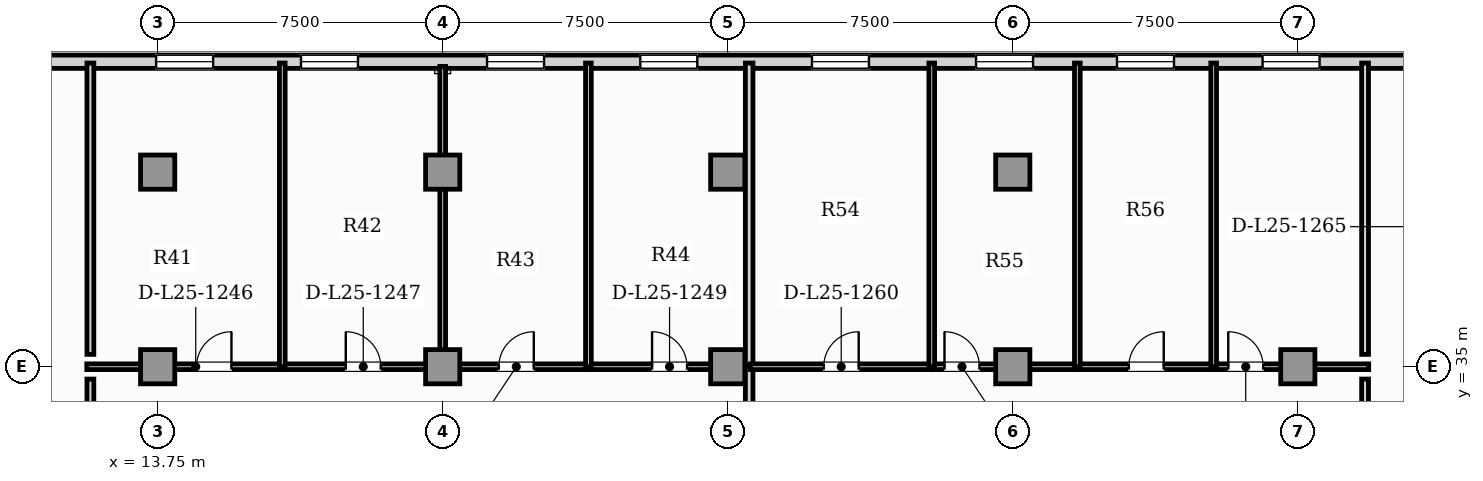
"""IFC4 building model, lengths in metres.
Left out: names, types, materials, properties, quantities, classifications, styles, units other than length and angle.
Written with IfcOpenShell. Run it as: python <this file> out.ifc"""

import sys

from ifc_helpers import new_model, si_unit, direction, frame, frame_2d, origin, origin_2d, place, context, subcontext, project, spatial, rectangle, extrude, element, fill, save


model = new_model("IFC4")
c1 = context("Model", 3, precision=1e-05, world=origin(), true_north=direction((0.0, 1.0)))
c2 = subcontext(c1, "Body", "Model", "MODEL_VIEW")
j1 = project(units=[si_unit("LENGTHUNIT", "METRE"), si_unit("PLANEANGLEUNIT", "RADIAN")], contexts=[c1])
p1 = place(None, origin())
s1 = spatial("IfcSite", under=j1, at=p1, CompositionType="ELEMENT")
p2 = place(p1, origin())
s2 = spatial("IfcBuilding", under=s1, at=p2, CompositionType="ELEMENT")
p3 = place(p2, frame((0.0, 0.0, 104.15)))
s3 = spatial("IfcBuildingStorey", under=s2, at=p3, CompositionType="ELEMENT", Elevation=104.15)
for number, where, z_axis, x_axis in (
    (1, (13.75, 40.12, 0.0), (0.0, 0.0, 1.0), (1.0, 0.0, 0.0)),
    (2, (21.25, 40.12, 0.0), (0.0, 0.0, 1.0), (1.0, 0.0, 0.0)),
    (3, (28.75, 40.12, 0.0), (0.0, 0.0, 1.0), (1.0, 0.0, 0.0)),
    (4, (36.25, 40.12, 0.0), (0.0, 0.0, 1.0), (1.0, 0.0, 0.0)),
    (5, (13.75, 35.0, 0.0), (0.0, 0.0, 1.0), (1.0, 0.0, 0.0)),
    (6, (21.25, 35.0, 0.0), (0.0, 0.0, 1.0), (1.0, 0.0, 0.0)),
    (7, (28.75, 35.0, 0.0), (0.0, 0.0, 1.0), (1.0, 0.0, 0.0)),
    (8, (36.25, 35.0, 0.0), (0.0, 0.0, 1.0), (1.0, 0.0, 0.0)),
    (9, (43.75, 35.0, 0.0), (0.0, 0.0, 1.0), (1.0, 0.0, 0.0)),
):
    element("IfcColumn", number, at=place(p3, frame(where, z_axis=z_axis, x_axis=x_axis)), inside=s3, PredefinedType="COLUMN", context=c2, shape_type="SweptSolid", body=[
        extrude(rectangle(XDim=0.9, YDim=0.9, at=origin_2d()), origin(), (0.0, 0.0, 1.0), 3.85),
    ])
p4 = place(p3, frame((51.66, 43.025, 0.0), z_axis=(0.0, 0.0, 1.0), x_axis=(-1.0, 0.0, 0.0)))
e10 = element("IfcWall", 10, at=p4, inside=s3, PredefinedType="SOLIDWALL", context=c2, shape_type="SweptSolid", body=[
    extrude(rectangle(XDim=45.82, YDim=0.35, at=frame_2d((22.91, 0.0))), origin(), (0.0, 0.0, 1.0), 3.6),
])
p5 = place(p4, frame((42.468, 0.0, 0.9)))
e11 = element("IfcOpeningElement", 11, at=p5, cuts=e10, PredefinedType="OPENING", context=c2, shape_type="SweptSolid", body=[
    extrude(rectangle(XDim=1.5, YDim=1.95, at=frame_2d((0.75, 0.975))), frame((0.0, 0.185, 0.0), z_axis=(0.0, -1.0, 0.0), x_axis=(1.0, 0.0, 0.0)), (0.0, 0.0, 1.0), 0.37),
])
p6 = place(p4, frame((1.853, 0.0, 0.9)))
e12 = element("IfcOpeningElement", 12, at=p6, cuts=e10, PredefinedType="OPENING", context=c2, shape_type="SweptSolid", body=[
    extrude(rectangle(XDim=1.5, YDim=1.95, at=frame_2d((0.75, 0.975))), frame((0.0, 0.185, 0.0), z_axis=(0.0, -1.0, 0.0), x_axis=(1.0, 0.0, 0.0)), (0.0, 0.0, 1.0), 0.37),
])
p7 = place(p4, frame((36.45, 0.0, 0.9)))
e13 = element("IfcOpeningElement", 13, at=p7, cuts=e10, PredefinedType="OPENING", context=c2, shape_type="SweptSolid", body=[
    extrude(rectangle(XDim=1.5, YDim=1.95, at=frame_2d((0.75, 0.975))), frame((0.0, 0.185, 0.0), z_axis=(0.0, -1.0, 0.0), x_axis=(1.0, 0.0, 0.0)), (0.0, 0.0, 1.0), 0.37),
])
p8 = place(p4, frame((32.639, 0.0, 0.9)))
e14 = element("IfcOpeningElement", 14, at=p8, cuts=e10, PredefinedType="OPENING", context=c2, shape_type="SweptSolid", body=[
    extrude(rectangle(XDim=1.5, YDim=1.95, at=frame_2d((0.75, 0.975))), frame((0.0, 0.185, 0.0), z_axis=(0.0, -1.0, 0.0), x_axis=(1.0, 0.0, 0.0)), (0.0, 0.0, 1.0), 0.37),
])
p9 = place(p4, frame((27.743, 0.0, 0.9)))
e15 = element("IfcOpeningElement", 15, at=p9, cuts=e10, PredefinedType="OPENING", context=c2, shape_type="SweptSolid", body=[
    extrude(rectangle(XDim=1.5, YDim=1.95, at=frame_2d((0.75, 0.975))), frame((0.0, 0.185, 0.0), z_axis=(0.0, -1.0, 0.0), x_axis=(1.0, 0.0, 0.0)), (0.0, 0.0, 1.0), 0.37),
])
p10 = place(p4, frame((23.711, 0.0, 0.9)))
e16 = element("IfcOpeningElement", 16, at=p10, cuts=e10, PredefinedType="OPENING", context=c2, shape_type="SweptSolid", body=[
    extrude(rectangle(XDim=1.5, YDim=1.95, at=frame_2d((0.75, 0.975))), frame((0.0, 0.185, 0.0), z_axis=(0.0, -1.0, 0.0), x_axis=(1.0, 0.0, 0.0)), (0.0, 0.0, 1.0), 0.37),
])
p11 = place(p4, frame((19.194, 0.0, 0.9)))
e17 = element("IfcOpeningElement", 17, at=p11, cuts=e10, PredefinedType="OPENING", context=c2, shape_type="SweptSolid", body=[
    extrude(rectangle(XDim=1.5, YDim=1.95, at=frame_2d((0.75, 0.975))), frame((0.0, 0.185, 0.0), z_axis=(0.0, -1.0, 0.0), x_axis=(1.0, 0.0, 0.0)), (0.0, 0.0, 1.0), 0.37),
])
p12 = place(p4, frame((14.876, 0.0, 0.9)))
e18 = element("IfcOpeningElement", 18, at=p12, cuts=e10, PredefinedType="OPENING", context=c2, shape_type="SweptSolid", body=[
    extrude(rectangle(XDim=1.5, YDim=1.95, at=frame_2d((0.75, 0.975))), frame((0.0, 0.185, 0.0), z_axis=(0.0, -1.0, 0.0), x_axis=(1.0, 0.0, 0.0)), (0.0, 0.0, 1.0), 0.37),
])
p13 = place(p4, frame((11.167, 0.0, 0.9)))
e19 = element("IfcOpeningElement", 19, at=p13, cuts=e10, PredefinedType="OPENING", context=c2, shape_type="SweptSolid", body=[
    extrude(rectangle(XDim=1.5, YDim=1.95, at=frame_2d((0.75, 0.975))), frame((0.0, 0.185, 0.0), z_axis=(0.0, -1.0, 0.0), x_axis=(1.0, 0.0, 0.0)), (0.0, 0.0, 1.0), 0.37),
])
p14 = place(p4, frame((7.337, 0.0, 0.9)))
e20 = element("IfcOpeningElement", 20, at=p14, cuts=e10, PredefinedType="OPENING", context=c2, shape_type="SweptSolid", body=[
    extrude(rectangle(XDim=1.5, YDim=1.95, at=frame_2d((0.75, 0.975))), frame((0.0, 0.185, 0.0), z_axis=(0.0, -1.0, 0.0), x_axis=(1.0, 0.0, 0.0)), (0.0, 0.0, 1.0), 0.37),
])
p15 = place(p3, frame((11.885, 35.0, 0.0), z_axis=(0.0, 0.0, 1.0), x_axis=(1.0, 0.0, 0.0)))
e21 = element("IfcWall", 21, at=p15, inside=s3, PredefinedType="PARTITIONING", context=c2, shape_type="SweptSolid", body=[
    extrude(rectangle(XDim=5.149, YDim=0.15, at=frame_2d((2.574, 0.0))), origin(), (0.0, 0.0, 1.0), 2.983),
])
p16 = place(p15, frame((2.887, 0.0, 0.0)))
e22 = element("IfcOpeningElement", 22, at=p16, cuts=e21, PredefinedType="OPENING", context=c2, shape_type="SweptSolid", body=[
    extrude(rectangle(XDim=0.92, YDim=2.1, at=frame_2d((0.46, 1.05))), frame((0.0, 0.085, 0.0), z_axis=(0.0, -1.0, 0.0), x_axis=(1.0, 0.0, 0.0)), (0.0, 0.0, 1.0), 0.17),
])
p17 = place(p3, frame((17.064, 35.0, 0.0), z_axis=(0.0, 0.0, 1.0), x_axis=(1.0, 0.0, 0.0)))
e23 = element("IfcWall", 23, at=p17, inside=s3, PredefinedType="PARTITIONING", context=c2, shape_type="SweptSolid", body=[
    extrude(rectangle(XDim=4.191, YDim=0.15, at=frame_2d((2.095, 0.0))), origin(), (0.0, 0.0, 1.0), 2.983),
])
p18 = place(p17, frame((1.635, 0.0, 0.0)))
e24 = element("IfcOpeningElement", 24, at=p18, cuts=e23, PredefinedType="OPENING", context=c2, shape_type="SweptSolid", body=[
    extrude(rectangle(XDim=0.92, YDim=2.1, at=frame_2d((0.46, 1.05))), frame((0.0, 0.085, 0.0), z_axis=(0.0, -1.0, 0.0), x_axis=(1.0, 0.0, 0.0)), (0.0, 0.0, 1.0), 0.17),
])
p19 = place(p3, frame((21.285, 35.0, 0.0), z_axis=(0.0, 0.0, 1.0), x_axis=(1.0, 0.0, 0.0)))
e25 = element("IfcWall", 25, at=p19, inside=s3, PredefinedType="PARTITIONING", context=c2, shape_type="SweptSolid", body=[
    extrude(rectangle(XDim=3.804, YDim=0.15, at=frame_2d((1.902, 0.0))), origin(), (0.0, 0.0, 1.0), 2.983),
])
p20 = place(p19, frame((1.442, 0.0, 0.0)))
e26 = element("IfcOpeningElement", 26, at=p20, cuts=e25, PredefinedType="OPENING", context=c2, shape_type="SweptSolid", body=[
    extrude(rectangle(XDim=0.92, YDim=2.1, at=frame_2d((0.46, 1.05))), frame((0.0, 0.085, 0.0), z_axis=(0.0, -1.0, 0.0), x_axis=(1.0, 0.0, 0.0)), (0.0, 0.0, 1.0), 0.17),
])
p21 = place(p3, frame((25.119, 35.0, 0.0), z_axis=(0.0, 0.0, 1.0), x_axis=(1.0, 0.0, 0.0)))
e27 = element("IfcWall", 27, at=p21, inside=s3, PredefinedType="PARTITIONING", context=c2, shape_type="SweptSolid", body=[
    extrude(rectangle(XDim=4.2, YDim=0.15, at=frame_2d((2.1, 0.0))), origin(), (0.0, 0.0, 1.0), 2.983),
])
p22 = place(p21, frame((1.64, 0.0, 0.0)))
e28 = element("IfcOpeningElement", 28, at=p22, cuts=e27, PredefinedType="OPENING", context=c2, shape_type="SweptSolid", body=[
    extrude(rectangle(XDim=0.92, YDim=2.1, at=frame_2d((0.46, 1.05))), frame((0.0, 0.085, 0.0), z_axis=(0.0, -1.0, 0.0), x_axis=(1.0, 0.0, 0.0)), (0.0, 0.0, 1.0), 0.17),
])
p23 = place(p3, frame((29.314, 33.495, 0.0), z_axis=(0.0, 0.0, 1.0), x_axis=(0.0, 1.0, 0.0)))
e29 = element("IfcWall", 29, at=p23, inside=s3, PredefinedType="PARTITIONING", context=c2, shape_type="SweptSolid", body=[
    extrude(rectangle(XDim=1.51, YDim=0.2, at=frame_2d((0.755, 0.0))), origin(), (0.0, 0.0, 1.0), 3.6),
])
p24 = place(p3, frame((17.029, 34.995, 0.0), z_axis=(0.0, 0.0, 1.0), x_axis=(0.0, 1.0, 0.0)))
e30 = element("IfcWall", 30, at=p24, inside=s3, PredefinedType="PARTITIONING", context=c2, shape_type="SweptSolid", body=[
    extrude(rectangle(XDim=7.995, YDim=0.15, at=frame_2d((3.998, 0.0))), origin(), (0.0, 0.0, 1.0), 3.6),
])
p25 = place(p3, frame((21.25, 34.995, 0.0), z_axis=(0.0, 0.0, 1.0), x_axis=(0.0, 1.0, 0.0)))
e31 = element("IfcWall", 31, at=p25, inside=s3, PredefinedType="PARTITIONING", context=c2, shape_type="SweptSolid", body=[
    extrude(rectangle(XDim=7.907, YDim=0.15, at=frame_2d((3.954, 0.0))), origin(), (0.0, 0.0, 1.0), 3.6),
])
p26 = place(p3, frame((25.084, 34.995, 0.0), z_axis=(0.0, 0.0, 1.0), x_axis=(0.0, 1.0, 0.0)))
e32 = element("IfcWall", 32, at=p26, inside=s3, PredefinedType="PARTITIONING", context=c2, shape_type="SweptSolid", body=[
    extrude(rectangle(XDim=7.995, YDim=0.15, at=frame_2d((3.998, 0.0))), origin(), (0.0, 0.0, 1.0), 3.6),
])
p27 = place(p3, frame((29.314, 35.035, 0.0), z_axis=(0.0, 0.0, 1.0), x_axis=(0.0, 1.0, 0.0)))
e33 = element("IfcWall", 33, at=p27, inside=s3, PredefinedType="PARTITIONING", context=c2, shape_type="SweptSolid", body=[
    extrude(rectangle(XDim=7.955, YDim=0.2, at=frame_2d((3.978, 0.0))), origin(), (0.0, 0.0, 1.0), 3.6),
])
p28 = place(p3, frame((29.349, 35.0, 0.0), z_axis=(0.0, 0.0, 1.0), x_axis=(1.0, 0.0, 0.0)))
e34 = element("IfcWall", 34, at=p28, inside=s3, PredefinedType="PARTITIONING", context=c2, shape_type="SweptSolid", body=[
    extrude(rectangle(XDim=4.774, YDim=0.15, at=frame_2d((2.387, 0.0))), origin(), (0.0, 0.0, 1.0), 2.983),
])
p29 = place(p28, frame((1.927, 0.0, 0.0)))
e35 = element("IfcOpeningElement", 35, at=p29, cuts=e34, PredefinedType="OPENING", context=c2, shape_type="SweptSolid", body=[
    extrude(rectangle(XDim=0.92, YDim=2.1, at=frame_2d((0.46, 1.05))), frame((0.0, 0.085, 0.0), z_axis=(0.0, -1.0, 0.0), x_axis=(1.0, 0.0, 0.0)), (0.0, 0.0, 1.0), 0.17),
])
p30 = place(p3, frame((34.153, 35.0, 0.0), z_axis=(0.0, 0.0, 1.0), x_axis=(1.0, 0.0, 0.0)))
e36 = element("IfcWall", 36, at=p30, inside=s3, PredefinedType="PARTITIONING", context=c2, shape_type="SweptSolid", body=[
    extrude(rectangle(XDim=3.801, YDim=0.15, at=frame_2d((1.9, 0.0))), origin(), (0.0, 0.0, 1.0), 2.983),
])
p31 = place(p30, frame((0.3, 0.0, 0.0)))
e37 = element("IfcOpeningElement", 37, at=p31, cuts=e36, PredefinedType="OPENING", context=c2, shape_type="SweptSolid", body=[
    extrude(rectangle(XDim=0.92, YDim=2.1, at=frame_2d((0.46, 1.05))), frame((0.0, 0.085, 0.0), z_axis=(0.0, -1.0, 0.0), x_axis=(1.0, 0.0, 0.0)), (0.0, 0.0, 1.0), 0.17),
])
p32 = place(p3, frame((37.984, 35.0, 0.0), z_axis=(0.0, 0.0, 1.0), x_axis=(1.0, 0.0, 0.0)))
e38 = element("IfcWall", 38, at=p32, inside=s3, PredefinedType="PARTITIONING", context=c2, shape_type="SweptSolid", body=[
    extrude(rectangle(XDim=3.557, YDim=0.15, at=frame_2d((1.779, 0.0))), origin(), (0.0, 0.0, 1.0), 2.983),
])
p33 = place(p32, frame((1.319, 0.0, 0.0)))
e39 = element("IfcOpeningElement", 39, at=p33, cuts=e38, PredefinedType="OPENING", context=c2, shape_type="SweptSolid", body=[
    extrude(rectangle(XDim=0.92, YDim=2.1, at=frame_2d((0.46, 1.05))), frame((0.0, 0.085, 0.0), z_axis=(0.0, -1.0, 0.0), x_axis=(1.0, 0.0, 0.0)), (0.0, 0.0, 1.0), 0.17),
])
p34 = place(p3, frame((41.571, 35.0, 0.0), z_axis=(0.0, 0.0, 1.0), x_axis=(1.0, 0.0, 0.0)))
e40 = element("IfcWall", 40, at=p34, inside=s3, PredefinedType="PARTITIONING", context=c2, shape_type="SweptSolid", body=[
    extrude(rectangle(XDim=4.044, YDim=0.15, at=frame_2d((2.022, 0.0))), origin(), (0.0, 0.0, 1.0), 2.983),
])
p35 = place(p34, frame((0.349, 0.0, 0.0)))
e41 = element("IfcOpeningElement", 41, at=p35, cuts=e40, PredefinedType="OPENING", context=c2, shape_type="SweptSolid", body=[
    extrude(rectangle(XDim=0.92, YDim=2.1, at=frame_2d((0.46, 1.05))), frame((0.0, 0.085, 0.0), z_axis=(0.0, -1.0, 0.0), x_axis=(1.0, 0.0, 0.0)), (0.0, 0.0, 1.0), 0.17),
])
for number, where, z_axis, x_axis in (
    (42, (34.118, 34.995, 0.0), (0.0, 0.0, 1.0), (0.0, 1.0, 0.0)),
    (43, (37.949, 34.995, 0.0), (0.0, 0.0, 1.0), (0.0, 1.0, 0.0)),
    (44, (41.536, 34.995, 0.0), (0.0, 0.0, 1.0), (0.0, 1.0, 0.0)),
):
    element("IfcWall", number, at=place(p3, frame(where, z_axis=z_axis, x_axis=x_axis)), inside=s3, PredefinedType="PARTITIONING", context=c2, shape_type="SweptSolid", body=[
        extrude(rectangle(XDim=7.995, YDim=0.15, at=frame_2d((3.998, 0.0))), origin(), (0.0, 0.0, 1.0), 3.6),
    ])
p36 = place(p3, frame((11.98, 33.495, 0.0), z_axis=(0.0, 0.0, 1.0), x_axis=(0.0, 1.0, 0.0)))
e45 = element("IfcWall", 45, at=p36, inside=s3, PredefinedType="PARTITIONING", context=c2, shape_type="SweptSolid", body=[
    extrude(rectangle(XDim=1.18, YDim=0.18, at=frame_2d((0.59, 0.0))), origin(), (0.0, 0.0, 1.0), 3.6),
])
p37 = place(p3, frame((11.98, 35.325, 0.0), z_axis=(0.0, 0.0, 1.0), x_axis=(0.0, 1.0, 0.0)))
e46 = element("IfcWall", 46, at=p37, inside=s3, PredefinedType="PARTITIONING", context=c2, shape_type="SweptSolid", body=[
    extrude(rectangle(XDim=7.665, YDim=0.18, at=frame_2d((3.833, 0.0))), origin(), (0.0, 0.0, 1.0), 3.6),
])
p38 = place(p3, frame((45.52, 34.675, 0.0), z_axis=(0.0, 0.0, 1.0), x_axis=(0.0, -1.0, 0.0)))
e47 = element("IfcWall", 47, at=p38, inside=s3, PredefinedType="PARTITIONING", context=c2, shape_type="SweptSolid", body=[
    extrude(rectangle(XDim=0.85, YDim=0.18, at=frame_2d((0.425, 0.0))), origin(), (0.0, 0.0, 1.0), 3.6),
])
p39 = place(p3, frame((45.52, 42.99, 0.0), z_axis=(0.0, 0.0, 1.0), x_axis=(0.0, -1.0, 0.0)))
e48 = element("IfcWall", 48, at=p39, inside=s3, PredefinedType="PARTITIONING", context=c2, shape_type="SweptSolid", body=[
    extrude(rectangle(XDim=7.665, YDim=0.18, at=frame_2d((3.833, 0.0))), origin(), (0.0, 0.0, 1.0), 3.6),
])
p40 = place(p7, origin())
e49 = element("IfcWindow", 49, at=p40, inside=s3, PartitioningType="SINGLE_PANEL", PredefinedType="WINDOW", context=c2, shape_type="SweptSolid", body=[
    extrude(rectangle(XDim=1.5, YDim=1.95, at=frame_2d((0.75, 0.975))), frame((0.0, 0.03, 0.0), z_axis=(0.0, -1.0, 0.0), x_axis=(1.0, 0.0, 0.0)), (0.0, 0.0, 1.0), 0.06),
])
fill(e13, e49)
p41 = place(p8, origin())
e50 = element("IfcWindow", 50, at=p41, inside=s3, PartitioningType="SINGLE_PANEL", PredefinedType="WINDOW", context=c2, shape_type="SweptSolid", body=[
    extrude(rectangle(XDim=1.5, YDim=1.95, at=frame_2d((0.75, 0.975))), frame((0.0, 0.03, 0.0), z_axis=(0.0, -1.0, 0.0), x_axis=(1.0, 0.0, 0.0)), (0.0, 0.0, 1.0), 0.06),
])
fill(e14, e50)
p42 = place(p9, origin())
e51 = element("IfcWindow", 51, at=p42, inside=s3, PartitioningType="SINGLE_PANEL", PredefinedType="WINDOW", context=c2, shape_type="SweptSolid", body=[
    extrude(rectangle(XDim=1.5, YDim=1.95, at=frame_2d((0.75, 0.975))), frame((0.0, 0.03, 0.0), z_axis=(0.0, -1.0, 0.0), x_axis=(1.0, 0.0, 0.0)), (0.0, 0.0, 1.0), 0.06),
])
fill(e15, e51)
p43 = place(p10, origin())
e52 = element("IfcWindow", 52, at=p43, inside=s3, PartitioningType="SINGLE_PANEL", PredefinedType="WINDOW", context=c2, shape_type="SweptSolid", body=[
    extrude(rectangle(XDim=1.5, YDim=1.95, at=frame_2d((0.75, 0.975))), frame((0.0, 0.03, 0.0), z_axis=(0.0, -1.0, 0.0), x_axis=(1.0, 0.0, 0.0)), (0.0, 0.0, 1.0), 0.06),
])
fill(e16, e52)
p44 = place(p11, origin())
e53 = element("IfcWindow", 53, at=p44, inside=s3, PartitioningType="SINGLE_PANEL", PredefinedType="WINDOW", context=c2, shape_type="SweptSolid", body=[
    extrude(rectangle(XDim=1.5, YDim=1.95, at=frame_2d((0.75, 0.975))), frame((0.0, 0.03, 0.0), z_axis=(0.0, -1.0, 0.0), x_axis=(1.0, 0.0, 0.0)), (0.0, 0.0, 1.0), 0.06),
])
fill(e17, e53)
p45 = place(p12, origin())
e54 = element("IfcWindow", 54, at=p45, inside=s3, PartitioningType="SINGLE_PANEL", PredefinedType="WINDOW", context=c2, shape_type="SweptSolid", body=[
    extrude(rectangle(XDim=1.5, YDim=1.95, at=frame_2d((0.75, 0.975))), frame((0.0, 0.03, 0.0), z_axis=(0.0, -1.0, 0.0), x_axis=(1.0, 0.0, 0.0)), (0.0, 0.0, 1.0), 0.06),
])
fill(e18, e54)
p46 = place(p13, origin())
e55 = element("IfcWindow", 55, at=p46, inside=s3, PartitioningType="SINGLE_PANEL", PredefinedType="WINDOW", context=c2, shape_type="SweptSolid", body=[
    extrude(rectangle(XDim=1.5, YDim=1.95, at=frame_2d((0.75, 0.975))), frame((0.0, 0.03, 0.0), z_axis=(0.0, -1.0, 0.0), x_axis=(1.0, 0.0, 0.0)), (0.0, 0.0, 1.0), 0.06),
])
fill(e19, e55)
p47 = place(p14, origin())
e56 = element("IfcWindow", 56, at=p47, inside=s3, PartitioningType="SINGLE_PANEL", PredefinedType="WINDOW", context=c2, shape_type="SweptSolid", body=[
    extrude(rectangle(XDim=1.5, YDim=1.95, at=frame_2d((0.75, 0.975))), frame((0.0, 0.03, 0.0), z_axis=(0.0, -1.0, 0.0), x_axis=(1.0, 0.0, 0.0)), (0.0, 0.0, 1.0), 0.06),
])
fill(e20, e56)
p48 = place(p16, origin())
e57 = element("IfcDoor", 57, at=p48, inside=s3, OperationType="SINGLE_SWING_RIGHT", PredefinedType="DOOR", context=c2, shape_type="SweptSolid", body=[
    extrude(rectangle(XDim=0.92, YDim=2.1, at=frame_2d((0.46, 1.05))), frame((0.0, 0.025, 0.0), z_axis=(0.0, -1.0, 0.0), x_axis=(1.0, 0.0, 0.0)), (0.0, 0.0, 1.0), 0.05),
])
fill(e22, e57)
p49 = place(p18, origin())
e58 = element("IfcDoor", 58, at=p49, inside=s3, OperationType="SINGLE_SWING_LEFT", PredefinedType="DOOR", context=c2, shape_type="SweptSolid", body=[
    extrude(rectangle(XDim=0.92, YDim=2.1, at=frame_2d((0.46, 1.05))), frame((0.0, 0.025, 0.0), z_axis=(0.0, -1.0, 0.0), x_axis=(1.0, 0.0, 0.0)), (0.0, 0.0, 1.0), 0.05),
])
fill(e24, e58)
p50 = place(p20, origin())
e59 = element("IfcDoor", 59, at=p50, inside=s3, OperationType="SINGLE_SWING_RIGHT", PredefinedType="DOOR", context=c2, shape_type="SweptSolid", body=[
    extrude(rectangle(XDim=0.92, YDim=2.1, at=frame_2d((0.46, 1.05))), frame((0.0, 0.025, 0.0), z_axis=(0.0, -1.0, 0.0), x_axis=(1.0, 0.0, 0.0)), (0.0, 0.0, 1.0), 0.05),
])
fill(e26, e59)
p51 = place(p22, origin())
e60 = element("IfcDoor", 60, at=p51, inside=s3, OperationType="SINGLE_SWING_LEFT", PredefinedType="DOOR", context=c2, shape_type="SweptSolid", body=[
    extrude(rectangle(XDim=0.92, YDim=2.1, at=frame_2d((0.46, 1.05))), frame((0.0, 0.025, 0.0), z_axis=(0.0, -1.0, 0.0), x_axis=(1.0, 0.0, 0.0)), (0.0, 0.0, 1.0), 0.05),
])
fill(e28, e60)
p52 = place(p29, origin())
e61 = element("IfcDoor", 61, at=p52, inside=s3, OperationType="SINGLE_SWING_RIGHT", PredefinedType="DOOR", context=c2, shape_type="SweptSolid", body=[
    extrude(rectangle(XDim=0.92, YDim=2.1, at=frame_2d((0.46, 1.05))), frame((0.0, 0.025, 0.0), z_axis=(0.0, -1.0, 0.0), x_axis=(1.0, 0.0, 0.0)), (0.0, 0.0, 1.0), 0.05),
])
fill(e35, e61)
p53 = place(p31, origin())
e62 = element("IfcDoor", 62, at=p53, inside=s3, OperationType="SINGLE_SWING_LEFT", PredefinedType="DOOR", context=c2, shape_type="SweptSolid", body=[
    extrude(rectangle(XDim=0.92, YDim=2.1, at=frame_2d((0.46, 1.05))), frame((0.0, 0.025, 0.0), z_axis=(0.0, -1.0, 0.0), x_axis=(1.0, 0.0, 0.0)), (0.0, 0.0, 1.0), 0.05),
])
fill(e37, e62)
p54 = place(p33, origin())
e63 = element("IfcDoor", 63, at=p54, inside=s3, OperationType="SINGLE_SWING_RIGHT", PredefinedType="DOOR", context=c2, shape_type="SweptSolid", body=[
    extrude(rectangle(XDim=0.92, YDim=2.1, at=frame_2d((0.46, 1.05))), frame((0.0, 0.025, 0.0), z_axis=(0.0, -1.0, 0.0), x_axis=(1.0, 0.0, 0.0)), (0.0, 0.0, 1.0), 0.05),
])
fill(e39, e63)
p55 = place(p35, origin())
e64 = element("IfcDoor", 64, at=p55, inside=s3, OperationType="SINGLE_SWING_LEFT", PredefinedType="DOOR", context=c2, shape_type="SweptSolid", body=[
    extrude(rectangle(XDim=0.92, YDim=2.1, at=frame_2d((0.46, 1.05))), frame((0.0, 0.025, 0.0), z_axis=(0.0, -1.0, 0.0), x_axis=(1.0, 0.0, 0.0)), (0.0, 0.0, 1.0), 0.05),
])
fill(e41, e64)
save(model, sys.argv[1])
